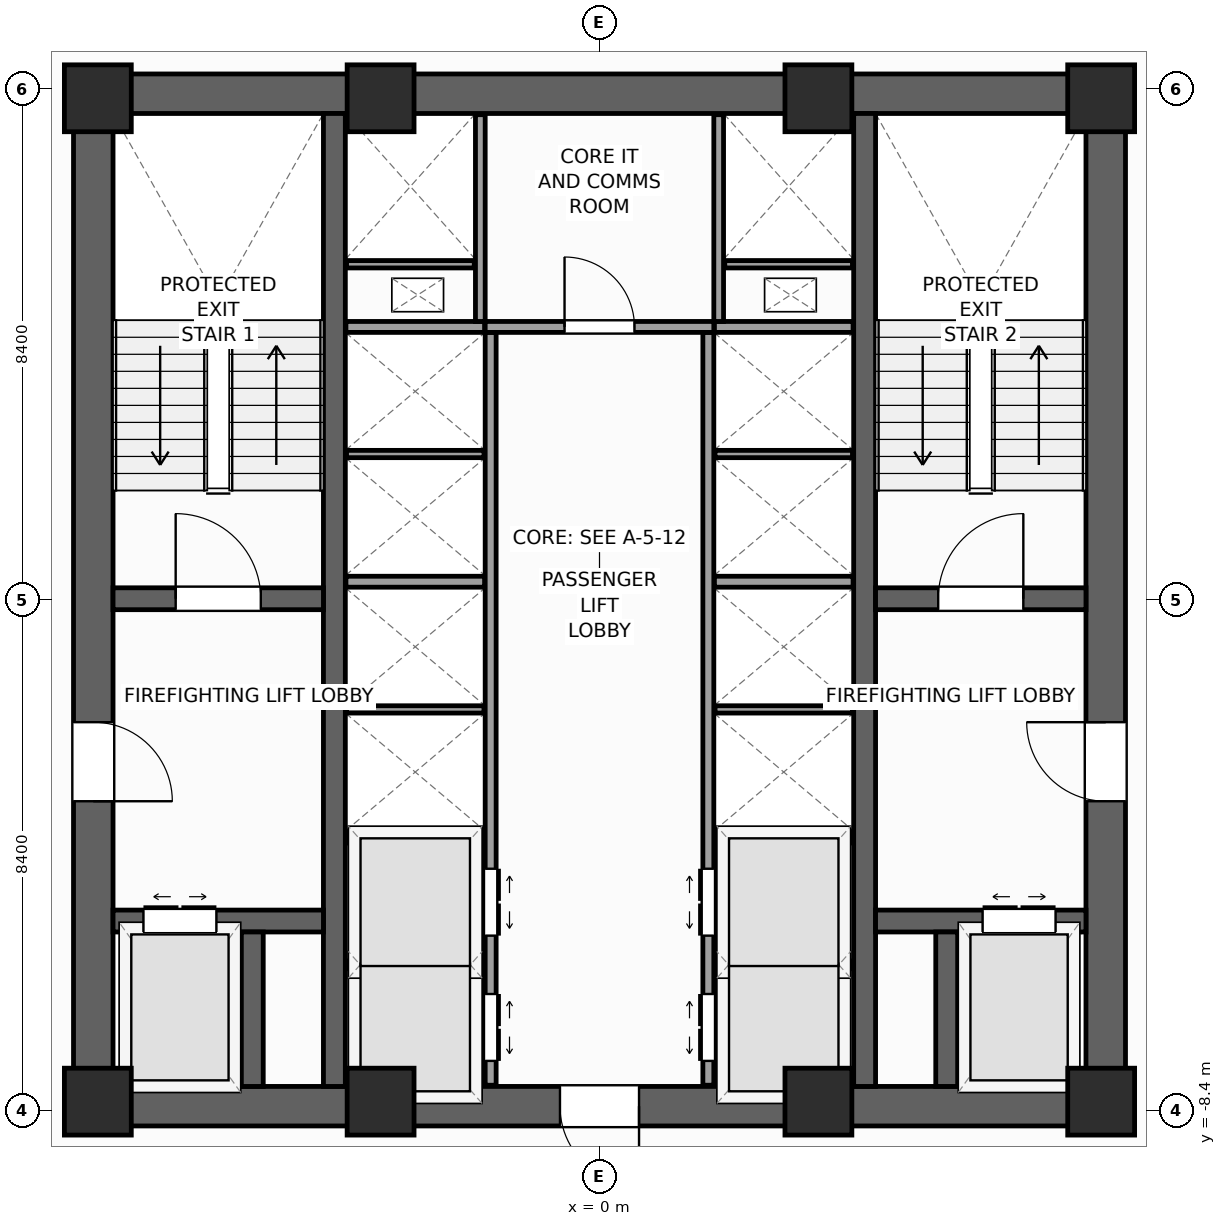
"""IFC4 building model, lengths in metres.
Left out: names, types, materials, properties, quantities, classifications, styles, units other than length and angle.
Written with IfcOpenShell. Run it as: python <this file> out.ifc"""

import sys

from ifc_helpers import new_model, si_unit, direction, frame, frame_2d, origin, origin_2d, place, context, subcontext, project, spatial, rectangle, extrude, source, transform, mapped, element, fill, save


model = new_model("IFC4")
c1 = context("Model", 3, precision=1e-05, world=origin(), true_north=direction((0.0, 1.0)))
c2 = subcontext(c1, "Body", "Model", "MODEL_VIEW")
j1 = project(units=[si_unit("LENGTHUNIT", "METRE"), si_unit("PLANEANGLEUNIT", "RADIAN")], contexts=[c1])
p1 = place(None, origin())
s1 = spatial("IfcSite", under=j1, at=p1, CompositionType="ELEMENT")
p2 = place(p1, origin())
s2 = spatial("IfcBuilding", under=s1, at=p2, CompositionType="ELEMENT")
p3 = place(p2, frame((0.0, 0.0, 135.2)))
s3 = spatial("IfcBuildingStorey", under=s2, at=p3, CompositionType="ELEMENT", Elevation=135.2)
p4 = place(p3, frame((-8.65, -8.325, 0.0), z_axis=(0.0, 0.0, 1.0), x_axis=(1.0, 0.0, 0.0)))
e1 = element("IfcWall", 1, at=p4, inside=s3, PredefinedType="SHEAR", context=c2, shape_type="SweptSolid", body=[
    extrude(rectangle(XDim=17.3, YDim=0.65, at=frame_2d((8.65, 0.0))), origin(), (0.0, 0.0, 1.0), 4.0),
])
p5 = place(p4, frame((8.0, 0.0, 0.0)))
e2 = element("IfcOpeningElement", 2, at=p5, cuts=e1, PredefinedType="OPENING", context=c2, shape_type="SweptSolid", body=[
    extrude(rectangle(XDim=1.3, YDim=2.2, at=frame_2d((0.65, 1.1))), frame((0.0, 0.335, 0.0), z_axis=(0.0, -1.0, 0.0), x_axis=(1.0, 0.0, 0.0)), (0.0, 0.0, 1.0), 0.67),
])
p6 = place(p3, frame((-8.65, 8.325, 0.0), z_axis=(0.0, 0.0, 1.0), x_axis=(1.0, 0.0, 0.0)))
e3 = element("IfcWall", 3, at=p6, inside=s3, PredefinedType="SHEAR", context=c2, shape_type="SweptSolid", body=[
    extrude(rectangle(XDim=17.3, YDim=0.65, at=frame_2d((8.65, 0.0))), origin(), (0.0, 0.0, 1.0), 4.0),
])
p7 = place(p3, frame((-8.325, -8.0, 0.0), z_axis=(0.0, 0.0, 1.0), x_axis=(0.0, 1.0, 0.0)))
e4 = element("IfcWall", 4, at=p7, inside=s3, PredefinedType="SHEAR", context=c2, shape_type="SweptSolid", body=[
    extrude(rectangle(XDim=16.0, YDim=0.65, at=frame_2d((8.0, 0.0))), origin(), (0.0, 0.0, 1.0), 4.0),
])
p8 = place(p7, frame((4.69, 0.0, 0.0)))
e5 = element("IfcOpeningElement", 5, at=p8, cuts=e4, PredefinedType="OPENING", context=c2, shape_type="SweptSolid", body=[
    extrude(rectangle(XDim=1.3, YDim=2.2, at=frame_2d((0.65, 1.1))), frame((0.0, 0.335, 0.0), z_axis=(0.0, -1.0, 0.0), x_axis=(1.0, 0.0, 0.0)), (0.0, 0.0, 1.0), 0.67),
])
p9 = place(p3, frame((8.325, -8.0, 0.0), z_axis=(0.0, 0.0, 1.0), x_axis=(0.0, 1.0, 0.0)))
e6 = element("IfcWall", 6, at=p9, inside=s3, PredefinedType="SHEAR", context=c2, shape_type="SweptSolid", body=[
    extrude(rectangle(XDim=16.0, YDim=0.65, at=frame_2d((8.0, 0.0))), origin(), (0.0, 0.0, 1.0), 4.0),
])
p10 = place(p9, frame((4.69, 0.0, 0.0)))
e7 = element("IfcOpeningElement", 7, at=p10, cuts=e6, PredefinedType="OPENING", context=c2, shape_type="SweptSolid", body=[
    extrude(rectangle(XDim=1.3, YDim=2.2, at=frame_2d((0.65, 1.1))), frame((0.0, 0.335, 0.0), z_axis=(0.0, -1.0, 0.0), x_axis=(1.0, 0.0, 0.0)), (0.0, 0.0, 1.0), 0.67),
])
for number, where, z_axis, x_axis in (
    (8, (-4.36, -8.0, 0.0), (0.0, 0.0, 1.0), (0.0, 1.0, 0.0)),
    (9, (4.36, -8.0, 0.0), (0.0, 0.0, 1.0), (0.0, 1.0, 0.0)),
):
    element("IfcWall", number, at=place(p3, frame(where, z_axis=z_axis, x_axis=x_axis)), inside=s3, PredefinedType="SHEAR", context=c2, shape_type="SweptSolid", body=[
        extrude(rectangle(XDim=16.0, YDim=0.36, at=frame_2d((8.0, 0.0))), origin(), (0.0, 0.0, 1.0), 4.0),
    ])
p11 = place(p3, frame((-8.0, 0.02, 0.0), z_axis=(0.0, 0.0, 1.0), x_axis=(1.0, 0.0, 0.0)))
e10 = element("IfcWall", 10, at=p11, inside=s3, PredefinedType="SHEAR", context=c2, shape_type="SweptSolid", body=[
    extrude(rectangle(XDim=3.46, YDim=0.36, at=frame_2d((1.73, 0.0))), origin(), (0.0, 0.0, 1.0), 4.0),
])
p12 = place(p11, frame((1.03, 0.0, 0.0)))
e11 = element("IfcOpeningElement", 11, at=p12, cuts=e10, PredefinedType="OPENING", context=c2, shape_type="SweptSolid", body=[
    extrude(rectangle(XDim=1.4, YDim=2.2, at=frame_2d((0.7, 1.1))), frame((0.0, 0.19, 0.0), z_axis=(0.0, -1.0, 0.0), x_axis=(1.0, 0.0, 0.0)), (0.0, 0.0, 1.0), 0.38),
])
p13 = place(p3, frame((4.54, 0.02, 0.0), z_axis=(0.0, 0.0, 1.0), x_axis=(1.0, 0.0, 0.0)))
e12 = element("IfcWall", 12, at=p13, inside=s3, PredefinedType="SHEAR", context=c2, shape_type="SweptSolid", body=[
    extrude(rectangle(XDim=3.46, YDim=0.36, at=frame_2d((1.73, 0.0))), origin(), (0.0, 0.0, 1.0), 4.0),
])
p14 = place(p13, frame((1.03, 0.0, 0.0)))
e13 = element("IfcOpeningElement", 13, at=p14, cuts=e12, PredefinedType="OPENING", context=c2, shape_type="SweptSolid", body=[
    extrude(rectangle(XDim=1.4, YDim=2.2, at=frame_2d((0.7, 1.1))), frame((0.0, 0.19, 0.0), z_axis=(0.0, -1.0, 0.0), x_axis=(1.0, 0.0, 0.0)), (0.0, 0.0, 1.0), 0.38),
])
p15 = place(p3, frame((-8.0, -5.28, 0.0), z_axis=(0.0, 0.0, 1.0), x_axis=(1.0, 0.0, 0.0)))
e14 = element("IfcWall", 14, at=p15, inside=s3, PredefinedType="SHEAR", context=c2, shape_type="SweptSolid", body=[
    extrude(rectangle(XDim=3.46, YDim=0.36, at=frame_2d((1.73, 0.0))), origin(), (0.0, 0.0, 1.0), 4.0),
])
p16 = place(p15, frame((0.5, 0.0, 0.0)))
e15 = element("IfcOpeningElement", 15, at=p16, cuts=e14, PredefinedType="OPENING", context=c2, shape_type="SweptSolid", body=[
    extrude(rectangle(XDim=1.2, YDim=2.25, at=frame_2d((0.6, 1.125))), frame((0.0, 0.19, 0.0), z_axis=(0.0, -1.0, 0.0), x_axis=(1.0, 0.0, 0.0)), (0.0, 0.0, 1.0), 0.38),
])
p17 = place(p3, frame((4.54, -5.28, 0.0), z_axis=(0.0, 0.0, 1.0), x_axis=(1.0, 0.0, 0.0)))
e16 = element("IfcWall", 16, at=p17, inside=s3, PredefinedType="SHEAR", context=c2, shape_type="SweptSolid", body=[
    extrude(rectangle(XDim=3.46, YDim=0.36, at=frame_2d((1.73, 0.0))), origin(), (0.0, 0.0, 1.0), 4.0),
])
p18 = place(p17, frame((1.76, 0.0, 0.0)))
e17 = element("IfcOpeningElement", 17, at=p18, cuts=e16, PredefinedType="OPENING", context=c2, shape_type="SweptSolid", body=[
    extrude(rectangle(XDim=1.2, YDim=2.25, at=frame_2d((0.6, 1.125))), frame((0.0, 0.19, 0.0), z_axis=(0.0, -1.0, 0.0), x_axis=(1.0, 0.0, 0.0)), (0.0, 0.0, 1.0), 0.38),
])
for number, where, z_axis, x_axis in (
    (18, (-5.71, -8.0, 0.0), (0.0, 0.0, 1.0), (0.0, 1.0, 0.0)),
    (19, (5.71, -8.0, 0.0), (0.0, 0.0, 1.0), (0.0, 1.0, 0.0)),
):
    element("IfcWall", number, at=place(p3, frame(where, z_axis=z_axis, x_axis=x_axis)), inside=s3, PredefinedType="SHEAR", context=c2, shape_type="SweptSolid", body=[
        extrude(rectangle(XDim=2.54, YDim=0.36, at=frame_2d((1.27, 0.0))), origin(), (0.0, 0.0, 1.0), 4.0),
    ])
m1 = source(origin(), c2, "Body", "SweptSolid", [
    extrude(rectangle(XDim=1.1, YDim=1.1, at=origin_2d()), origin(), (0.0, 0.0, 1.0), 4.0),
])
for number, where, z_axis, x_axis in (
    (20, (-8.25, -8.25, 0.0), (0.0, 0.0, 1.0), (1.0, 0.0, 0.0)),
    (21, (8.25, -8.25, 0.0), (0.0, 0.0, 1.0), (1.0, 0.0, 0.0)),
    (22, (8.25, 8.25, 0.0), (0.0, 0.0, 1.0), (1.0, 0.0, 0.0)),
    (23, (-8.25, 8.25, 0.0), (0.0, 0.0, 1.0), (1.0, 0.0, 0.0)),
    (24, (-3.6, -8.25, 0.0), (0.0, 0.0, 1.0), (1.0, 0.0, 0.0)),
    (25, (3.6, -8.25, 0.0), (0.0, 0.0, 1.0), (1.0, 0.0, 0.0)),
    (26, (-3.6, 8.25, 0.0), (0.0, 0.0, 1.0), (1.0, 0.0, 0.0)),
    (27, (3.6, 8.25, 0.0), (0.0, 0.0, 1.0), (1.0, 0.0, 0.0)),
):
    element("IfcColumn", number, at=place(p3, frame(where, z_axis=z_axis, x_axis=x_axis)), inside=s3, PredefinedType="PILASTER", context=c2, shape_type="MappedRepresentation", body=[
        mapped(m1, transform((0.0, 0.0, 0.0), scale=1.0)),
    ])
p19 = place(p3, frame((-1.79, -7.98, 0.0), z_axis=(0.0, 0.0, 1.0), x_axis=(0.0, 1.0, 0.0)))
e28 = element("IfcWall", 28, at=p19, inside=s3, PredefinedType="PARTITIONING", context=c2, shape_type="SweptSolid", body=[
    extrude(rectangle(XDim=12.38, YDim=0.18, at=frame_2d((6.19, 0.0))), origin(), (0.0, 0.0, 1.0), 3.6),
])
p20 = place(p19, frame((0.4, 0.0, 0.0)))
e29 = element("IfcOpeningElement", 29, at=p20, cuts=e28, PredefinedType="OPENING", context=c2, shape_type="SweptSolid", body=[
    extrude(rectangle(XDim=1.1, YDim=2.2, at=frame_2d((0.55, 1.1))), frame((0.0, 0.1, 0.0), z_axis=(0.0, -1.0, 0.0), x_axis=(1.0, 0.0, 0.0)), (0.0, 0.0, 1.0), 0.2),
])
p21 = place(p19, frame((2.46, 0.0, 0.0)))
e30 = element("IfcOpeningElement", 30, at=p21, cuts=e28, PredefinedType="OPENING", context=c2, shape_type="SweptSolid", body=[
    extrude(rectangle(XDim=1.1, YDim=2.2, at=frame_2d((0.55, 1.1))), frame((0.0, 0.1, 0.0), z_axis=(0.0, -1.0, 0.0), x_axis=(1.0, 0.0, 0.0)), (0.0, 0.0, 1.0), 0.2),
])
p22 = place(p3, frame((1.79, -7.98, 0.0), z_axis=(0.0, 0.0, 1.0), x_axis=(0.0, 1.0, 0.0)))
e31 = element("IfcWall", 31, at=p22, inside=s3, PredefinedType="PARTITIONING", context=c2, shape_type="SweptSolid", body=[
    extrude(rectangle(XDim=12.38, YDim=0.18, at=frame_2d((6.19, 0.0))), origin(), (0.0, 0.0, 1.0), 3.6),
])
p23 = place(p22, frame((0.4, 0.0, 0.0)))
e32 = element("IfcOpeningElement", 32, at=p23, cuts=e31, PredefinedType="OPENING", context=c2, shape_type="SweptSolid", body=[
    extrude(rectangle(XDim=1.1, YDim=2.2, at=frame_2d((0.55, 1.1))), frame((0.0, 0.1, 0.0), z_axis=(0.0, -1.0, 0.0), x_axis=(1.0, 0.0, 0.0)), (0.0, 0.0, 1.0), 0.2),
])
p24 = place(p22, frame((2.46, 0.0, 0.0)))
e33 = element("IfcOpeningElement", 33, at=p24, cuts=e31, PredefinedType="OPENING", context=c2, shape_type="SweptSolid", body=[
    extrude(rectangle(XDim=1.1, YDim=2.2, at=frame_2d((0.55, 1.1))), frame((0.0, 0.1, 0.0), z_axis=(0.0, -1.0, 0.0), x_axis=(1.0, 0.0, 0.0)), (0.0, 0.0, 1.0), 0.2),
])
p25 = place(p3, frame((-1.88, 4.49, 0.0), z_axis=(0.0, 0.0, 1.0), x_axis=(1.0, 0.0, 0.0)))
e34 = element("IfcWall", 34, at=p25, inside=s3, PredefinedType="PARTITIONING", context=c2, shape_type="SweptSolid", body=[
    extrude(rectangle(XDim=3.76, YDim=0.18, at=frame_2d((1.88, 0.0))), origin(), (0.0, 0.0, 1.0), 3.6),
])
p26 = place(p25, frame((1.305, 0.0, 0.0)))
e35 = element("IfcOpeningElement", 35, at=p26, cuts=e34, PredefinedType="OPENING", context=c2, shape_type="SweptSolid", body=[
    extrude(rectangle(XDim=1.15, YDim=2.25, at=frame_2d((0.575, 1.125))), frame((0.0, 0.1, 0.0), z_axis=(0.0, -1.0, 0.0), x_axis=(1.0, 0.0, 0.0)), (0.0, 0.0, 1.0), 0.2),
])
for number, where, z_axis, x_axis in (
    (36, (-4.17, -3.9, 0.0), (0.0, 0.0, 1.0), (1.0, 0.0, 0.0)),
    (37, (1.89, -3.9, 0.0), (0.0, 0.0, 1.0), (1.0, 0.0, 0.0)),
    (38, (-4.17, 0.3, 0.0), (0.0, 0.0, 1.0), (1.0, 0.0, 0.0)),
    (39, (1.89, 0.3, 0.0), (0.0, 0.0, 1.0), (1.0, 0.0, 0.0)),
    (40, (-4.17, 4.49, 0.0), (0.0, 0.0, 1.0), (1.0, 0.0, 0.0)),
    (41, (1.89, 4.49, 0.0), (0.0, 0.0, 1.0), (1.0, 0.0, 0.0)),
):
    element("IfcWall", number, at=place(p3, frame(where, z_axis=z_axis, x_axis=x_axis)), inside=s3, PredefinedType="PARTITIONING", context=c2, shape_type="SweptSolid", body=[
        extrude(rectangle(XDim=2.28, YDim=0.18, at=frame_2d((1.14, 0.0))), origin(), (0.0, 0.0, 1.0), 3.6),
    ])
for number, where, z_axis, x_axis in (
    (42, (-4.16, -6.0, 0.0), (0.0, 0.0, 1.0), (1.0, 0.0, 0.0)),
    (43, (1.9, -6.0, 0.0), (0.0, 0.0, 1.0), (1.0, 0.0, 0.0)),
    (44, (-4.16, -1.8, 0.0), (0.0, 0.0, 1.0), (1.0, 0.0, 0.0)),
    (45, (1.9, -1.8, 0.0), (0.0, 0.0, 1.0), (1.0, 0.0, 0.0)),
    (46, (-4.16, 2.4, 0.0), (0.0, 0.0, 1.0), (1.0, 0.0, 0.0)),
    (47, (1.9, 2.4, 0.0), (0.0, 0.0, 1.0), (1.0, 0.0, 0.0)),
):
    element("IfcWall", number, at=place(p3, frame(where, z_axis=z_axis, x_axis=x_axis)), inside=s3, PredefinedType="PARTITIONING", context=c2, shape_type="SweptSolid", body=[
        extrude(rectangle(XDim=2.26, YDim=0.12, at=frame_2d((1.13, 0.0))), origin(), (0.0, 0.0, 1.0), 3.6),
    ])
for number, where, z_axis, x_axis in (
    (48, (-1.96, 4.58, 0.0), (0.0, 0.0, 1.0), (0.0, 1.0, 0.0)),
    (49, (1.96, 4.58, 0.0), (0.0, 0.0, 1.0), (0.0, 1.0, 0.0)),
):
    element("IfcWall", number, at=place(p3, frame(where, z_axis=z_axis, x_axis=x_axis)), inside=s3, PredefinedType="PARTITIONING", context=c2, shape_type="SweptSolid", body=[
        extrude(rectangle(XDim=3.4, YDim=0.16, at=frame_2d((1.7, 0.0))), origin(), (0.0, 0.0, 1.0), 3.6),
    ])
for number, where, z_axis, x_axis in (
    (50, (-4.16, 5.52, 0.0), (0.0, 0.0, 1.0), (1.0, 0.0, 0.0)),
    (51, (2.06, 5.52, 0.0), (0.0, 0.0, 1.0), (1.0, 0.0, 0.0)),
):
    element("IfcWall", number, at=place(p3, frame(where, z_axis=z_axis, x_axis=x_axis)), inside=s3, PredefinedType="PARTITIONING", context=c2, shape_type="SweptSolid", body=[
        extrude(rectangle(XDim=2.1, YDim=0.12, at=frame_2d((1.05, 0.0))), origin(), (0.0, 0.0, 1.0), 3.6),
    ])
m2 = source(origin(), c2, "Body", "SweptSolid", [
    extrude(rectangle(XDim=1.4, YDim=2.2, at=frame_2d((0.7, 1.1))), frame((0.0, 0.025, 0.0), z_axis=(0.0, -1.0, 0.0), x_axis=(1.0, 0.0, 0.0)), (0.0, 0.0, 1.0), 0.05),
])
p27 = place(p12, origin())
e52 = element("IfcDoor", 52, at=p27, inside=s3, OperationType="SINGLE_SWING_LEFT", PredefinedType="DOOR", context=c2, shape_type="MappedRepresentation", body=[
    mapped(m2, transform((0.0, 0.0, 0.0), scale=1.0)),
])
fill(e11, e52)
p28 = place(p14, origin())
e53 = element("IfcDoor", 53, at=p28, inside=s3, OperationType="SINGLE_SWING_RIGHT", PredefinedType="DOOR", context=c2, shape_type="MappedRepresentation", body=[
    mapped(m2, transform((0.0, 0.0, 0.0), scale=1.0)),
])
fill(e13, e53)
m3 = source(origin(), c2, "Body", "SweptSolid", [
    extrude(rectangle(XDim=1.3, YDim=2.2, at=frame_2d((0.65, 1.1))), frame((0.0, 0.025, 0.0), z_axis=(0.0, -1.0, 0.0), x_axis=(1.0, 0.0, 0.0)), (0.0, 0.0, 1.0), 0.05),
])
p29 = place(p8, frame((1.3, 0.0, 0.0), z_axis=(0.0, 0.0, 1.0), x_axis=(-1.0, 0.0, 0.0)))
e54 = element("IfcDoor", 54, at=p29, inside=s3, OperationType="SINGLE_SWING_LEFT", PredefinedType="DOOR", context=c2, shape_type="MappedRepresentation", body=[
    mapped(m3, transform((0.0, 0.0, 0.0), scale=1.0)),
])
fill(e5, e54)
p30 = place(p10, origin())
e55 = element("IfcDoor", 55, at=p30, inside=s3, OperationType="SINGLE_SWING_RIGHT", PredefinedType="DOOR", context=c2, shape_type="MappedRepresentation", body=[
    mapped(m3, transform((0.0, 0.0, 0.0), scale=1.0)),
])
fill(e7, e55)
p31 = place(p5, frame((1.3, 0.0, 0.0), z_axis=(0.0, 0.0, 1.0), x_axis=(-1.0, 0.0, 0.0)))
e56 = element("IfcDoor", 56, at=p31, inside=s3, OperationType="SINGLE_SWING_RIGHT", PredefinedType="DOOR", context=c2, shape_type="MappedRepresentation", body=[
    mapped(m3, transform((0.0, 0.0, 0.0), scale=1.0)),
])
fill(e2, e56)
m4 = source(origin(), c2, "Body", "SweptSolid", [
    extrude(rectangle(XDim=1.2, YDim=2.25, at=frame_2d((0.6, 1.125))), frame((0.0, 0.025, 0.0), z_axis=(0.0, -1.0, 0.0), x_axis=(1.0, 0.0, 0.0)), (0.0, 0.0, 1.0), 0.05),
])
p32 = place(p16, origin())
e57 = element("IfcDoor", 57, at=p32, inside=s3, OperationType="DOUBLE_DOOR_SLIDING", PredefinedType="DOOR", context=c2, shape_type="MappedRepresentation", body=[
    mapped(m4, transform((0.0, 0.0, 0.0), scale=1.0)),
])
fill(e15, e57)
p33 = place(p18, origin())
e58 = element("IfcDoor", 58, at=p33, inside=s3, OperationType="DOUBLE_DOOR_SLIDING", PredefinedType="DOOR", context=c2, shape_type="MappedRepresentation", body=[
    mapped(m4, transform((0.0, 0.0, 0.0), scale=1.0)),
])
fill(e17, e58)
m5 = source(origin(), c2, "Body", "SweptSolid", [
    extrude(rectangle(XDim=1.1, YDim=2.2, at=frame_2d((0.55, 1.1))), frame((0.0, 0.025, 0.0), z_axis=(0.0, -1.0, 0.0), x_axis=(1.0, 0.0, 0.0)), (0.0, 0.0, 1.0), 0.05),
])
p34 = place(p20, frame((1.1, 0.0, 0.0), z_axis=(0.0, 0.0, 1.0), x_axis=(-1.0, 0.0, 0.0)))
e59 = element("IfcDoor", 59, at=p34, inside=s3, OperationType="DOUBLE_DOOR_SLIDING", PredefinedType="DOOR", context=c2, shape_type="MappedRepresentation", body=[
    mapped(m5, transform((0.0, 0.0, 0.0), scale=1.0)),
])
fill(e29, e59)
p35 = place(p21, frame((1.1, 0.0, 0.0), z_axis=(0.0, 0.0, 1.0), x_axis=(-1.0, 0.0, 0.0)))
e60 = element("IfcDoor", 60, at=p35, inside=s3, OperationType="DOUBLE_DOOR_SLIDING", PredefinedType="DOOR", context=c2, shape_type="MappedRepresentation", body=[
    mapped(m5, transform((0.0, 0.0, 0.0), scale=1.0)),
])
fill(e30, e60)
p36 = place(p23, origin())
e61 = element("IfcDoor", 61, at=p36, inside=s3, OperationType="DOUBLE_DOOR_SLIDING", PredefinedType="DOOR", context=c2, shape_type="MappedRepresentation", body=[
    mapped(m5, transform((0.0, 0.0, 0.0), scale=1.0)),
])
fill(e32, e61)
p37 = place(p24, origin())
e62 = element("IfcDoor", 62, at=p37, inside=s3, OperationType="DOUBLE_DOOR_SLIDING", PredefinedType="DOOR", context=c2, shape_type="MappedRepresentation", body=[
    mapped(m5, transform((0.0, 0.0, 0.0), scale=1.0)),
])
fill(e33, e62)
m6 = source(origin(), c2, "Body", "SweptSolid", [
    extrude(rectangle(XDim=1.15, YDim=2.25, at=frame_2d((0.575, 1.125))), frame((0.0, 0.025, 0.0), z_axis=(0.0, -1.0, 0.0), x_axis=(1.0, 0.0, 0.0)), (0.0, 0.0, 1.0), 0.05),
])
p38 = place(p26, origin())
e63 = element("IfcDoor", 63, at=p38, inside=s3, OperationType="SINGLE_SWING_LEFT", PredefinedType="DOOR", context=c2, shape_type="MappedRepresentation", body=[
    mapped(m6, transform((0.0, 0.0, 0.0), scale=1.0)),
])
fill(e35, e63)
save(model, sys.argv[1])
